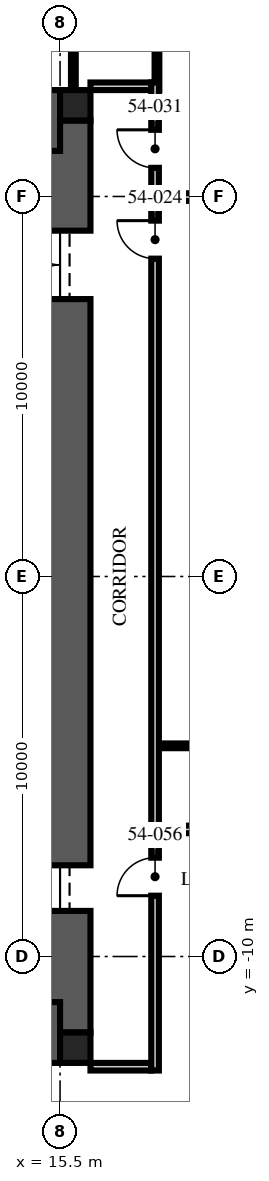
"""IFC4 building model, lengths in metres.
Left out: names, types, materials, properties, quantities, classifications, styles, units other than length and angle.
Written with IfcOpenShell. Run it as: python <this file> out.ifc"""

import sys

from ifc_helpers import new_model, si_unit, direction, frame, frame_2d, origin, origin_2d, place, context, subcontext, project, spatial, rectangle, extrude, element, fill, save


model = new_model("IFC4")
c1 = context("Model", 3, precision=1e-05, world=origin(), true_north=direction((0.0, 1.0)))
c2 = subcontext(c1, "Body", "Model", "MODEL_VIEW")
j1 = project(units=[si_unit("LENGTHUNIT", "METRE"), si_unit("PLANEANGLEUNIT", "RADIAN")], contexts=[c1])
p1 = place(None, origin())
s1 = spatial("IfcSite", under=j1, at=p1, CompositionType="ELEMENT")
p2 = place(p1, origin())
s2 = spatial("IfcBuilding", under=s1, at=p2, CompositionType="ELEMENT")
p3 = place(p2, frame((0.0, 0.0, 218.25)))
s3 = spatial("IfcBuildingStorey", under=s2, at=p3, CompositionType="ELEMENT", Elevation=218.25)
p4 = place(p3, frame((15.5, -12.0, -0.25), z_axis=(0.0, 0.0, 1.0), x_axis=(0.0, 1.0, 0.0)))
e1 = element("IfcWall", 1, at=p4, inside=s3, PredefinedType="SHEAR", context=c2, shape_type="SweptSolid", body=[
    extrude(rectangle(XDim=24.0, YDim=1.6, at=frame_2d((12.0, 0.0))), origin(), (0.0, 0.0, 1.0), 3.75),
])
p5 = place(p4, frame((3.2, 0.0, 0.25)))
e2 = element("IfcOpeningElement", 2, at=p5, cuts=e1, PredefinedType="OPENING", context=c2, shape_type="SweptSolid", body=[
    extrude(rectangle(XDim=1.2, YDim=2.1, at=frame_2d((0.6, 1.05))), frame((0.0, 0.81, 0.0), z_axis=(0.0, -1.0, 0.0), x_axis=(1.0, 0.0, 0.0)), (0.0, 0.0, 1.0), 1.62),
])
p6 = place(p4, frame((19.3, 0.0, 0.25)))
e3 = element("IfcOpeningElement", 3, at=p6, cuts=e1, PredefinedType="OPENING", context=c2, shape_type="SweptSolid", body=[
    extrude(rectangle(XDim=1.8, YDim=2.1, at=frame_2d((0.9, 1.05))), frame((0.0, 0.81, 0.0), z_axis=(0.0, -1.0, 0.0), x_axis=(1.0, 0.0, 0.0)), (0.0, 0.0, 1.0), 1.62),
])
for number, where, z_axis, x_axis in (
    (4, (-15.5, 12.0, -0.25), (0.0, 0.0, 1.0), (1.0, 0.0, 0.0)),
    (5, (-15.5, -12.0, -0.25), (0.0, 0.0, 1.0), (1.0, 0.0, 0.0)),
):
    element("IfcWall", number, at=place(p3, frame(where, z_axis=z_axis, x_axis=x_axis)), inside=s3, PredefinedType="SHEAR", context=c2, shape_type="SweptSolid", body=[
        extrude(rectangle(XDim=31.0, YDim=1.6, at=frame_2d((15.5, 0.0))), origin(), (0.0, 0.0, 1.0), 3.75),
    ])
for number, where, z_axis, x_axis in (
    (6, (15.9, 12.4, -0.25), (0.0, 0.0, 1.0), (1.0, 0.0, 0.0)),
    (7, (15.9, -12.4, -0.25), (0.0, 0.0, 1.0), (1.0, 0.0, 0.0)),
):
    element("IfcColumn", number, at=place(p3, frame(where, z_axis=z_axis, x_axis=x_axis)), inside=s3, PredefinedType="COLUMN", context=c2, shape_type="SweptSolid", body=[
        extrude(rectangle(XDim=0.8, YDim=0.8, at=origin_2d()), origin(), (0.0, 0.0, 1.0), 3.75),
    ])
for number, where, z_axis, x_axis in (
    (8, (16.3, 12.9, 0.0), (0.0, 0.0, 1.0), (1.0, 0.0, 0.0)),
    (9, (16.3, -12.9, 0.0), (0.0, 0.0, 1.0), (1.0, 0.0, 0.0)),
):
    element("IfcWall", number, at=place(p3, frame(where, z_axis=z_axis, x_axis=x_axis)), inside=s3, PredefinedType="PARTITIONING", context=c2, shape_type="SweptSolid", body=[
        extrude(rectangle(XDim=1.6, YDim=0.2, at=frame_2d((0.8, 0.0))), origin(), (0.0, 0.0, 1.0), 2.3),
    ])
for number, where, z_axis, x_axis in (
    (10, (18.1, -6.656, 0.0), (0.0, 0.0, 1.0), (1.0, 0.0, 0.0)),
    (11, (18.1, 9.984, 0.0), (0.0, 0.0, 1.0), (1.0, 0.0, 0.0)),
):
    element("IfcWall", number, at=place(p3, frame(where, z_axis=z_axis, x_axis=x_axis)), inside=s3, PredefinedType="PARTITIONING", context=c2, shape_type="SweptSolid", body=[
        extrude(rectangle(XDim=8.1, YDim=0.2, at=frame_2d((4.05, 0.0))), origin(), (0.0, 0.0, 1.0), 2.91),
    ])
p7 = place(p3, frame((18.1, -4.456, 0.0), z_axis=(0.0, 0.0, 1.0), x_axis=(1.0, 0.0, 0.0)))
e12 = element("IfcWall", 12, at=p7, inside=s3, PredefinedType="PARTITIONING", context=c2, shape_type="SweptSolid", body=[
    extrude(rectangle(XDim=2.2, YDim=0.125, at=frame_2d((1.1, 0.0))), origin(), (0.0, 0.0, 1.0), 3.5),
])
for number, where, z_axis, x_axis in (
    (13, (18.05, 12.8, 0.0), (0.0, 0.0, 1.0), (0.0, 1.0, 0.0)),
    (14, (15.85, 12.8, 0.0), (0.0, 0.0, 1.0), (0.0, 1.0, 0.0)),
):
    element("IfcWall", number, at=place(p3, frame(where, z_axis=z_axis, x_axis=x_axis)), inside=s3, PredefinedType="PARTITIONING", context=c2, shape_type="SweptSolid", body=[
        extrude(rectangle(XDim=2.8, YDim=0.125, at=frame_2d((1.4, 0.0))), origin(), (0.0, 0.0, 1.0), 2.3),
    ])
p8 = place(p3, frame((18.0, -13.0, 0.0), z_axis=(0.0, 0.0, 1.0), x_axis=(0.0, 1.0, 0.0)))
e15 = element("IfcWall", 15, at=p8, inside=s3, PredefinedType="PARTITIONING", context=c2, shape_type="SweptSolid", body=[
    extrude(rectangle(XDim=26.0, YDim=0.2, at=frame_2d((13.0, 0.0))), origin(), (0.0, 0.0, 1.0), 2.6),
])
p9 = place(p8, frame((21.364, 0.0, 0.0)))
e16 = element("IfcOpeningElement", 16, at=p9, cuts=e15, PredefinedType="OPENING", context=c2, shape_type="SweptSolid", body=[
    extrude(rectangle(XDim=1.0, YDim=2.2, at=frame_2d((0.5, 1.1))), frame((0.0, 0.11, 0.0), z_axis=(0.0, -1.0, 0.0), x_axis=(1.0, 0.0, 0.0)), (0.0, 0.0, 1.0), 0.22),
])
p10 = place(p8, frame((23.754, 0.0, 0.0)))
e17 = element("IfcOpeningElement", 17, at=p10, cuts=e15, PredefinedType="OPENING", context=c2, shape_type="SweptSolid", body=[
    extrude(rectangle(XDim=1.0, YDim=2.2, at=frame_2d((0.5, 1.1))), frame((0.0, 0.11, 0.0), z_axis=(0.0, -1.0, 0.0), x_axis=(1.0, 0.0, 0.0)), (0.0, 0.0, 1.0), 0.22),
])
p11 = place(p8, frame((4.6, 0.0, 0.0)))
e18 = element("IfcOpeningElement", 18, at=p11, cuts=e15, PredefinedType="OPENING", context=c2, shape_type="SweptSolid", body=[
    extrude(rectangle(XDim=1.0, YDim=2.2, at=frame_2d((0.5, 1.1))), frame((0.0, 0.11, 0.0), z_axis=(0.0, -1.0, 0.0), x_axis=(1.0, 0.0, 0.0)), (0.0, 0.0, 1.0), 0.22),
])
p12 = place(p5, origin())
e19 = element("IfcDoor", 19, at=p12, inside=s3, OperationType="SINGLE_SWING_LEFT", PredefinedType="DOOR", context=c2, shape_type="SweptSolid", body=[
    extrude(rectangle(XDim=1.2, YDim=2.1, at=frame_2d((0.6, 1.05))), frame((0.0, 0.025, 0.0), z_axis=(0.0, -1.0, 0.0), x_axis=(1.0, 0.0, 0.0)), (0.0, 0.0, 1.0), 0.05),
])
fill(e2, e19)
p13 = place(p6, origin())
e20 = element("IfcDoor", 20, at=p13, inside=s3, OperationType="DOUBLE_DOOR_SINGLE_SWING", PredefinedType="DOOR", context=c2, shape_type="SweptSolid", body=[
    extrude(rectangle(XDim=1.8, YDim=2.1, at=frame_2d((0.9, 1.05))), frame((0.0, 0.025, 0.0), z_axis=(0.0, -1.0, 0.0), x_axis=(1.0, 0.0, 0.0)), (0.0, 0.0, 1.0), 0.05),
])
fill(e3, e20)
p14 = place(p9, origin())
e21 = element("IfcDoor", 21, at=p14, inside=s3, OperationType="SINGLE_SWING_RIGHT", PredefinedType="DOOR", context=c2, shape_type="SweptSolid", body=[
    extrude(rectangle(XDim=1.0, YDim=2.2, at=frame_2d((0.5, 1.1))), frame((0.0, 0.025, 0.0), z_axis=(0.0, -1.0, 0.0), x_axis=(1.0, 0.0, 0.0)), (0.0, 0.0, 1.0), 0.05),
])
fill(e16, e21)
p15 = place(p10, origin())
e22 = element("IfcDoor", 22, at=p15, inside=s3, OperationType="SINGLE_SWING_RIGHT", PredefinedType="DOOR", context=c2, shape_type="SweptSolid", body=[
    extrude(rectangle(XDim=1.0, YDim=2.2, at=frame_2d((0.5, 1.1))), frame((0.0, 0.025, 0.0), z_axis=(0.0, -1.0, 0.0), x_axis=(1.0, 0.0, 0.0)), (0.0, 0.0, 1.0), 0.05),
])
fill(e17, e22)
p16 = place(p11, origin())
e23 = element("IfcDoor", 23, at=p16, inside=s3, OperationType="SINGLE_SWING_LEFT", PredefinedType="DOOR", context=c2, shape_type="SweptSolid", body=[
    extrude(rectangle(XDim=1.0, YDim=2.2, at=frame_2d((0.5, 1.1))), frame((0.0, 0.025, 0.0), z_axis=(0.0, -1.0, 0.0), x_axis=(1.0, 0.0, 0.0)), (0.0, 0.0, 1.0), 0.05),
])
fill(e18, e23)
save(model, sys.argv[1])
